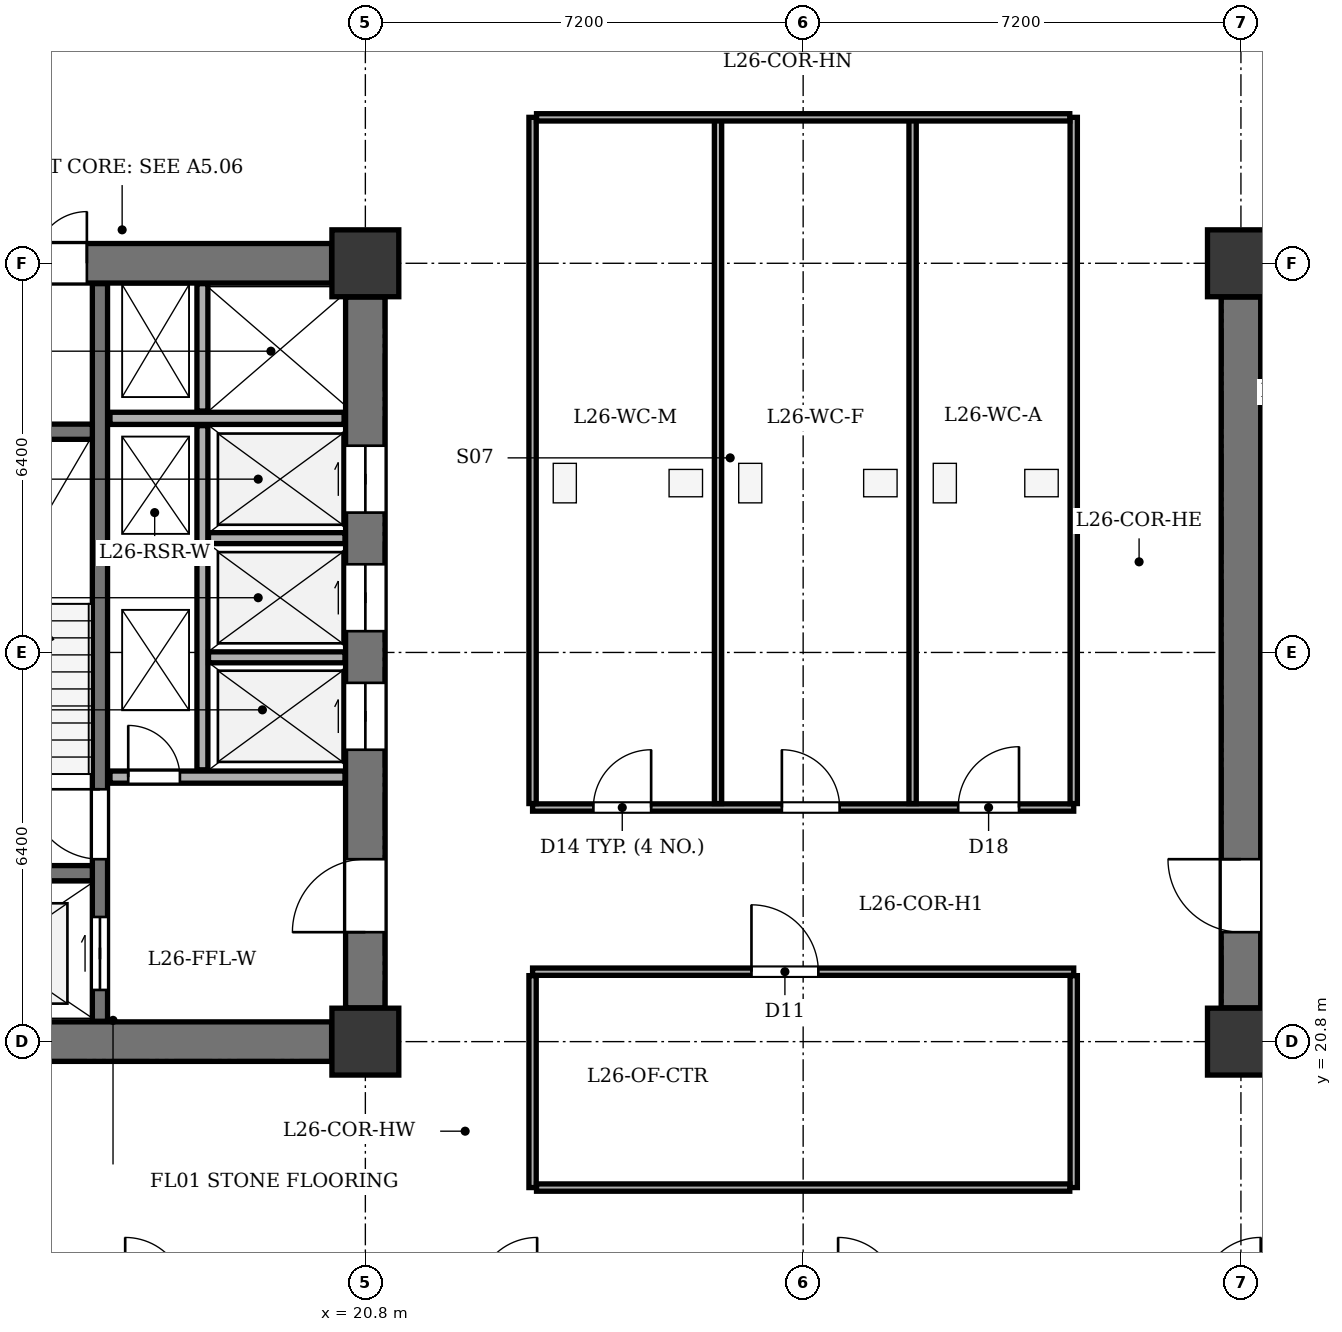
"""IFC4 building model, lengths in metres.
Left out: names, types, materials, properties, quantities, classifications, styles, units other than length and angle.
Written with IfcOpenShell. Run it as: python <this file> out.ifc"""

import sys

from ifc_helpers import new_model, si_unit, direction, frame, frame_2d, origin, origin_2d, place, context, subcontext, project, spatial, rectangle, extrude, element, fill, save


model = new_model("IFC4")
c1 = context("Model", 3, precision=1e-05, world=origin(), true_north=direction((0.0, 1.0)))
c2 = subcontext(c1, "Body", "Model", "MODEL_VIEW")
j1 = project(units=[si_unit("LENGTHUNIT", "METRE"), si_unit("PLANEANGLEUNIT", "RADIAN")], contexts=[c1])
p1 = place(None, origin())
s1 = spatial("IfcSite", under=j1, at=p1, CompositionType="ELEMENT")
p2 = place(p1, origin())
s2 = spatial("IfcBuilding", under=s1, at=p2, CompositionType="ELEMENT")
p3 = place(p2, frame((0.0, 0.0, 106.2)))
s3 = spatial("IfcBuildingStorey", under=s2, at=p3, CompositionType="ELEMENT", Elevation=106.2)
for number, where, z_axis, x_axis in (
    (1, (20.8, 20.8, 0.0), (0.0, 0.0, 1.0), (1.0, 0.0, 0.0)),
    (2, (20.8, 33.6, 0.0), (0.0, 0.0, 1.0), (1.0, 0.0, 0.0)),
    (3, (35.2, 20.8, 0.0), (0.0, 0.0, 1.0), (1.0, 0.0, 0.0)),
    (4, (35.2, 33.6, 0.0), (0.0, 0.0, 1.0), (1.0, 0.0, 0.0)),
):
    element("IfcColumn", number, at=place(p3, frame(where, z_axis=z_axis, x_axis=x_axis)), inside=s3, PredefinedType="COLUMN", context=c2, shape_type="SweptSolid", body=[
        extrude(rectangle(XDim=1.1, YDim=1.1, at=origin_2d()), origin(), (0.0, 0.0, 1.0), 3.9),
    ])
p4 = place(p3, frame((13.355, 20.8, 0.0), z_axis=(0.0, 0.0, 1.0), x_axis=(1.0, 0.0, 0.0)))
e5 = element("IfcWall", 5, at=p4, inside=s3, PredefinedType="SHEAR", context=c2, shape_type="SweptSolid", body=[
    extrude(rectangle(XDim=6.89, YDim=0.65, at=frame_2d((3.445, 0.0))), origin(), (0.0, 0.0, 1.0), 3.45),
])
p5 = place(p3, frame((13.355, 33.6, 0.0), z_axis=(0.0, 0.0, 1.0), x_axis=(1.0, 0.0, 0.0)))
e6 = element("IfcWall", 6, at=p5, inside=s3, PredefinedType="SHEAR", context=c2, shape_type="SweptSolid", body=[
    extrude(rectangle(XDim=6.89, YDim=0.65, at=frame_2d((3.445, 0.0))), origin(), (0.0, 0.0, 1.0), 3.45),
])
p6 = place(p5, frame((2.015, 0.0, 0.0)))
e7 = element("IfcOpeningElement", 7, at=p6, cuts=e6, PredefinedType="OPENING", context=c2, shape_type="SweptSolid", body=[
    extrude(rectangle(XDim=0.85, YDim=2.02, at=frame_2d((0.425, 1.01))), frame((0.0, 0.335, 0.0), z_axis=(0.0, -1.0, 0.0), x_axis=(1.0, 0.0, 0.0)), (0.0, 0.0, 1.0), 0.67),
])
p7 = place(p3, frame((20.8, 21.355, 0.0), z_axis=(0.0, 0.0, 1.0), x_axis=(0.0, 1.0, 0.0)))
e8 = element("IfcWall", 8, at=p7, inside=s3, PredefinedType="SHEAR", context=c2, shape_type="SweptSolid", body=[
    extrude(rectangle(XDim=11.69, YDim=0.65, at=frame_2d((5.845, 0.0))), origin(), (0.0, 0.0, 1.0), 3.45),
])
p8 = place(p7, frame((1.245, 0.0, 0.0)))
e9 = element("IfcOpeningElement", 9, at=p8, cuts=e8, PredefinedType="OPENING", context=c2, shape_type="SweptSolid", body=[
    extrude(rectangle(XDim=1.2, YDim=2.15, at=frame_2d((0.6, 1.075))), frame((0.0, 0.335, 0.0), z_axis=(0.0, -1.0, 0.0), x_axis=(1.0, 0.0, 0.0)), (0.0, 0.0, 1.0), 0.67),
])
p9 = place(p7, frame((4.245, 0.0, 0.0)))
e10 = element("IfcOpeningElement", 10, at=p9, cuts=e8, PredefinedType="OPENING", context=c2, shape_type="SweptSolid", body=[
    extrude(rectangle(XDim=1.1, YDim=2.1, at=frame_2d((0.55, 1.05))), frame((0.0, 0.335, 0.0), z_axis=(0.0, -1.0, 0.0), x_axis=(1.0, 0.0, 0.0)), (0.0, 0.0, 1.0), 0.67),
])
p10 = place(p7, frame((6.195, 0.0, 0.0)))
e11 = element("IfcOpeningElement", 11, at=p10, cuts=e8, PredefinedType="OPENING", context=c2, shape_type="SweptSolid", body=[
    extrude(rectangle(XDim=1.1, YDim=2.1, at=frame_2d((0.55, 1.05))), frame((0.0, 0.335, 0.0), z_axis=(0.0, -1.0, 0.0), x_axis=(1.0, 0.0, 0.0)), (0.0, 0.0, 1.0), 0.67),
])
p11 = place(p7, frame((8.145, 0.0, 0.0)))
e12 = element("IfcOpeningElement", 12, at=p11, cuts=e8, PredefinedType="OPENING", context=c2, shape_type="SweptSolid", body=[
    extrude(rectangle(XDim=1.1, YDim=2.1, at=frame_2d((0.55, 1.05))), frame((0.0, 0.335, 0.0), z_axis=(0.0, -1.0, 0.0), x_axis=(1.0, 0.0, 0.0)), (0.0, 0.0, 1.0), 0.67),
])
p12 = place(p3, frame((16.435, 21.135, 0.0), z_axis=(0.0, 0.0, 1.0), x_axis=(0.0, 1.0, 0.0)))
e13 = element("IfcWall", 13, at=p12, inside=s3, PredefinedType="SHEAR", context=c2, shape_type="SweptSolid", body=[
    extrude(rectangle(XDim=12.13, YDim=0.25, at=frame_2d((6.065, 0.0))), origin(), (0.0, 0.0, 1.0), 3.45),
])
p13 = place(p12, frame((0.515, 0.0, 0.0)))
e14 = element("IfcOpeningElement", 14, at=p13, cuts=e13, PredefinedType="OPENING", context=c2, shape_type="SweptSolid", body=[
    extrude(rectangle(XDim=1.2, YDim=2.15, at=frame_2d((0.6, 1.075))), frame((0.0, 0.135, 0.0), z_axis=(0.0, -1.0, 0.0), x_axis=(1.0, 0.0, 0.0)), (0.0, 0.0, 1.0), 0.27),
])
p14 = place(p12, frame((2.665, 0.0, 0.0)))
e15 = element("IfcOpeningElement", 15, at=p14, cuts=e13, PredefinedType="OPENING", context=c2, shape_type="SweptSolid", body=[
    extrude(rectangle(XDim=1.15, YDim=2.15, at=frame_2d((0.575, 1.075))), frame((0.0, 0.135, 0.0), z_axis=(0.0, -1.0, 0.0), x_axis=(1.0, 0.0, 0.0)), (0.0, 0.0, 1.0), 0.27),
])
for number, where, z_axis, x_axis in (
    (16, (13.135, 23.57, 0.0), (0.0, 0.0, 1.0), (1.0, 0.0, 0.0)),
    (17, (13.135, 30.83, 0.0), (0.0, 0.0, 1.0), (1.0, 0.0, 0.0)),
):
    element("IfcWall", number, at=place(p3, frame(where, z_axis=z_axis, x_axis=x_axis)), inside=s3, PredefinedType="SHEAR", context=c2, shape_type="SweptSolid", body=[
        extrude(rectangle(XDim=3.175, YDim=0.25, at=frame_2d((1.587, 0.0))), origin(), (0.0, 0.0, 1.0), 3.45),
    ])
p15 = place(p3, frame((16.6, 25.15, 0.0), z_axis=(0.0, 0.0, 1.0), x_axis=(1.0, 0.0, 0.0)))
e18 = element("IfcWall", 18, at=p15, inside=s3, PredefinedType="SOLIDWALL", context=c2, shape_type="SweptSolid", body=[
    extrude(rectangle(XDim=3.865, YDim=0.2, at=frame_2d((1.933, 0.0))), origin(), (0.0, 0.0, 1.0), 3.45),
])
p16 = place(p15, frame((0.3, 0.0, 0.0)))
e19 = element("IfcOpeningElement", 19, at=p16, cuts=e18, PredefinedType="OPENING", context=c2, shape_type="SweptSolid", body=[
    extrude(rectangle(XDim=0.85, YDim=2.02, at=frame_2d((0.425, 1.01))), frame((0.0, 0.11, 0.0), z_axis=(0.0, -1.0, 0.0), x_axis=(1.0, 0.0, 0.0)), (0.0, 0.0, 1.0), 0.22),
])
p17 = place(p3, frame((16.6, 31.05, 0.0), z_axis=(0.0, 0.0, 1.0), x_axis=(1.0, 0.0, 0.0)))
e20 = element("IfcWall", 20, at=p17, inside=s3, PredefinedType="SOLIDWALL", context=c2, shape_type="SweptSolid", body=[
    extrude(rectangle(XDim=3.85, YDim=0.2, at=frame_2d((1.925, 0.0))), origin(), (0.0, 0.0, 1.0), 3.45),
])
p18 = place(p3, frame((18.12, 25.27, 0.0), z_axis=(0.0, 0.0, 1.0), x_axis=(0.0, 1.0, 0.0)))
e21 = element("IfcWall", 21, at=p18, inside=s3, PredefinedType="PARTITIONING", context=c2, shape_type="SweptSolid", body=[
    extrude(rectangle(XDim=5.66, YDim=0.18, at=frame_2d((2.83, 0.0))), origin(), (0.0, 0.0, 1.0), 3.45),
])
p19 = place(p3, frame((18.12, 31.17, 0.0), z_axis=(0.0, 0.0, 1.0), x_axis=(0.0, 1.0, 0.0)))
e22 = element("IfcWall", 22, at=p19, inside=s3, PredefinedType="PARTITIONING", context=c2, shape_type="SweptSolid", body=[
    extrude(rectangle(XDim=2.095, YDim=0.18, at=frame_2d((1.047, 0.0))), origin(), (0.0, 0.0, 1.0), 3.45),
])
for number, where, z_axis, x_axis in (
    (23, (18.22, 27.12, 0.0), (0.0, 0.0, 1.0), (1.0, 0.0, 0.0)),
    (24, (18.22, 29.08, 0.0), (0.0, 0.0, 1.0), (1.0, 0.0, 0.0)),
):
    element("IfcWall", number, at=place(p3, frame(where, z_axis=z_axis, x_axis=x_axis)), inside=s3, PredefinedType="PARTITIONING", context=c2, shape_type="SweptSolid", body=[
        extrude(rectangle(XDim=2.245, YDim=0.18, at=frame_2d((1.123, 0.0))), origin(), (0.0, 0.0, 1.0), 3.45),
    ])
p20 = place(p3, frame((35.2, 21.355, 0.0), z_axis=(0.0, 0.0, 1.0), x_axis=(0.0, 1.0, 0.0)))
e25 = element("IfcWall", 25, at=p20, inside=s3, PredefinedType="SHEAR", context=c2, shape_type="SweptSolid", body=[
    extrude(rectangle(XDim=11.69, YDim=0.65, at=frame_2d((5.845, 0.0))), origin(), (0.0, 0.0, 1.0), 3.45),
])
p21 = place(p20, frame((1.245, 0.0, 0.0)))
e26 = element("IfcOpeningElement", 26, at=p21, cuts=e25, PredefinedType="OPENING", context=c2, shape_type="SweptSolid", body=[
    extrude(rectangle(XDim=1.2, YDim=2.15, at=frame_2d((0.6, 1.075))), frame((0.0, 0.335, 0.0), z_axis=(0.0, -1.0, 0.0), x_axis=(1.0, 0.0, 0.0)), (0.0, 0.0, 1.0), 0.67),
])
p22 = place(p3, frame((35.535, 25.15, 0.0), z_axis=(0.0, 0.0, 1.0), x_axis=(1.0, 0.0, 0.0)))
e27 = element("IfcWall", 27, at=p22, inside=s3, PredefinedType="SOLIDWALL", context=c2, shape_type="SweptSolid", body=[
    extrude(rectangle(XDim=3.865, YDim=0.2, at=frame_2d((1.933, 0.0))), origin(), (0.0, 0.0, 1.0), 3.45),
])
for number, where, z_axis, x_axis in (
    (28, (35.535, 27.12, 0.0), (0.0, 0.0, 1.0), (1.0, 0.0, 0.0)),
    (29, (35.535, 29.08, 0.0), (0.0, 0.0, 1.0), (1.0, 0.0, 0.0)),
):
    element("IfcWall", number, at=place(p3, frame(where, z_axis=z_axis, x_axis=x_axis)), inside=s3, PredefinedType="PARTITIONING", context=c2, shape_type="SweptSolid", body=[
        extrude(rectangle(XDim=2.245, YDim=0.18, at=frame_2d((1.123, 0.0))), origin(), (0.0, 0.0, 1.0), 3.45),
    ])
p23 = place(p3, frame((23.55, 24.65, 0.0), z_axis=(0.0, 0.0, 1.0), x_axis=(1.0, 0.0, 0.0)))
e30 = element("IfcWall", 30, at=p23, inside=s3, PredefinedType="PARTITIONING", context=c2, shape_type="SweptSolid", body=[
    extrude(rectangle(XDim=8.9, YDim=0.12, at=frame_2d((4.45, 0.0))), origin(), (0.0, 0.0, 1.0), 2.985),
])
p24 = place(p23, frame((1.0, 0.0, 0.0)))
e31 = element("IfcOpeningElement", 31, at=p24, cuts=e30, PredefinedType="OPENING", context=c2, shape_type="SweptSolid", body=[
    extrude(rectangle(XDim=0.95, YDim=2.1, at=frame_2d((0.475, 1.05))), frame((0.0, 0.07, 0.0), z_axis=(0.0, -1.0, 0.0), x_axis=(1.0, 0.0, 0.0)), (0.0, 0.0, 1.0), 0.14),
])
p25 = place(p23, frame((4.1, 0.0, 0.0)))
e32 = element("IfcOpeningElement", 32, at=p25, cuts=e30, PredefinedType="OPENING", context=c2, shape_type="SweptSolid", body=[
    extrude(rectangle(XDim=0.95, YDim=2.1, at=frame_2d((0.475, 1.05))), frame((0.0, 0.07, 0.0), z_axis=(0.0, -1.0, 0.0), x_axis=(1.0, 0.0, 0.0)), (0.0, 0.0, 1.0), 0.14),
])
p26 = place(p23, frame((7.0, 0.0, 0.0)))
e33 = element("IfcOpeningElement", 33, at=p26, cuts=e30, PredefinedType="OPENING", context=c2, shape_type="SweptSolid", body=[
    extrude(rectangle(XDim=1.0, YDim=2.1, at=frame_2d((0.5, 1.05))), frame((0.0, 0.07, 0.0), z_axis=(0.0, -1.0, 0.0), x_axis=(1.0, 0.0, 0.0)), (0.0, 0.0, 1.0), 0.14),
])
for number, where, z_axis, x_axis in (
    (34, (23.55, 24.715, 0.0), (0.0, 0.0, 1.0), (0.0, 1.0, 0.0)),
    (35, (32.45, 24.715, 0.0), (0.0, 0.0, 1.0), (0.0, 1.0, 0.0)),
    (36, (26.6, 24.715, 0.0), (0.0, 0.0, 1.0), (0.0, 1.0, 0.0)),
):
    element("IfcWall", number, at=place(p3, frame(where, z_axis=z_axis, x_axis=x_axis)), inside=s3, PredefinedType="PARTITIONING", context=c2, shape_type="SweptSolid", body=[
        extrude(rectangle(XDim=11.285, YDim=0.12, at=frame_2d((5.643, 0.0))), origin(), (0.0, 0.0, 1.0), 3.45),
    ])
p27 = place(p3, frame((29.8, 24.715, 0.0), z_axis=(0.0, 0.0, 1.0), x_axis=(0.0, 1.0, 0.0)))
e37 = element("IfcWall", 37, at=p27, inside=s3, PredefinedType="PARTITIONING", context=c2, shape_type="SweptSolid", body=[
    extrude(rectangle(XDim=11.285, YDim=0.12, at=frame_2d((5.643, 0.0))), origin(), (0.0, 0.0, 1.0), 2.985),
])
p28 = place(p3, frame((23.615, 36.0, 0.0), z_axis=(0.0, 0.0, 1.0), x_axis=(1.0, 0.0, 0.0)))
e38 = element("IfcWall", 38, at=p28, inside=s3, PredefinedType="PARTITIONING", context=c2, shape_type="SweptSolid", body=[
    extrude(rectangle(XDim=8.77, YDim=0.12, at=frame_2d((4.385, 0.0))), origin(), (0.0, 0.0, 1.0), 3.45),
])
p29 = place(p3, frame((23.55, 21.95, 0.0), z_axis=(0.0, 0.0, 1.0), x_axis=(1.0, 0.0, 0.0)))
e39 = element("IfcWall", 39, at=p29, inside=s3, PredefinedType="PARTITIONING", context=c2, shape_type="SweptSolid", body=[
    extrude(rectangle(XDim=8.9, YDim=0.12, at=frame_2d((4.45, 0.0))), origin(), (0.0, 0.0, 1.0), 2.985),
])
p30 = place(p29, frame((3.6, 0.0, 0.0)))
e40 = element("IfcOpeningElement", 40, at=p30, cuts=e39, PredefinedType="OPENING", context=c2, shape_type="SweptSolid", body=[
    extrude(rectangle(XDim=1.1, YDim=2.15, at=frame_2d((0.55, 1.075))), frame((0.0, 0.07, 0.0), z_axis=(0.0, -1.0, 0.0), x_axis=(1.0, 0.0, 0.0)), (0.0, 0.0, 1.0), 0.14),
])
for number, where, z_axis, x_axis in (
    (41, (23.55, 18.4, 0.0), (0.0, 0.0, 1.0), (0.0, 1.0, 0.0)),
    (42, (32.45, 18.4, 0.0), (0.0, 0.0, 1.0), (0.0, 1.0, 0.0)),
):
    element("IfcWall", number, at=place(p3, frame(where, z_axis=z_axis, x_axis=x_axis)), inside=s3, PredefinedType="PARTITIONING", context=c2, shape_type="SweptSolid", body=[
        extrude(rectangle(XDim=3.485, YDim=0.12, at=frame_2d((1.743, 0.0))), origin(), (0.0, 0.0, 1.0), 3.45),
    ])
p31 = place(p3, frame((23.615, 18.4, 0.0), z_axis=(0.0, 0.0, 1.0), x_axis=(1.0, 0.0, 0.0)))
e43 = element("IfcWall", 43, at=p31, inside=s3, PredefinedType="PARTITIONING", context=c2, shape_type="SweptSolid", body=[
    extrude(rectangle(XDim=8.77, YDim=0.12, at=frame_2d((4.385, 0.0))), origin(), (0.0, 0.0, 1.0), 3.45),
])
p32 = place(p6, origin())
e44 = element("IfcDoor", 44, at=p32, inside=s3, OperationType="SINGLE_SWING_RIGHT", PredefinedType="DOOR", context=c2, shape_type="SweptSolid", body=[
    extrude(rectangle(XDim=0.85, YDim=2.02, at=frame_2d((0.425, 1.01))), frame((0.0, 0.025, 0.0), z_axis=(0.0, -1.0, 0.0), x_axis=(1.0, 0.0, 0.0)), (0.0, 0.0, 1.0), 0.05),
])
fill(e7, e44)
p33 = place(p8, origin())
e45 = element("IfcDoor", 45, at=p33, inside=s3, OperationType="SINGLE_SWING_LEFT", PredefinedType="DOOR", context=c2, shape_type="SweptSolid", body=[
    extrude(rectangle(XDim=1.2, YDim=2.15, at=frame_2d((0.6, 1.075))), frame((0.0, 0.025, 0.0), z_axis=(0.0, -1.0, 0.0), x_axis=(1.0, 0.0, 0.0)), (0.0, 0.0, 1.0), 0.05),
])
fill(e9, e45)
p34 = place(p9, origin())
e46 = element("IfcDoor", 46, at=p34, inside=s3, OperationType="DOUBLE_DOOR_SLIDING", PredefinedType="DOOR", context=c2, shape_type="SweptSolid", body=[
    extrude(rectangle(XDim=1.1, YDim=2.1, at=frame_2d((0.55, 1.05))), frame((0.0, 0.025, 0.0), z_axis=(0.0, -1.0, 0.0), x_axis=(1.0, 0.0, 0.0)), (0.0, 0.0, 1.0), 0.05),
])
fill(e10, e46)
p35 = place(p10, origin())
e47 = element("IfcDoor", 47, at=p35, inside=s3, OperationType="DOUBLE_DOOR_SLIDING", PredefinedType="DOOR", context=c2, shape_type="SweptSolid", body=[
    extrude(rectangle(XDim=1.1, YDim=2.1, at=frame_2d((0.55, 1.05))), frame((0.0, 0.025, 0.0), z_axis=(0.0, -1.0, 0.0), x_axis=(1.0, 0.0, 0.0)), (0.0, 0.0, 1.0), 0.05),
])
fill(e11, e47)
p36 = place(p11, origin())
e48 = element("IfcDoor", 48, at=p36, inside=s3, OperationType="DOUBLE_DOOR_SLIDING", PredefinedType="DOOR", context=c2, shape_type="SweptSolid", body=[
    extrude(rectangle(XDim=1.1, YDim=2.1, at=frame_2d((0.55, 1.05))), frame((0.0, 0.025, 0.0), z_axis=(0.0, -1.0, 0.0), x_axis=(1.0, 0.0, 0.0)), (0.0, 0.0, 1.0), 0.05),
])
fill(e12, e48)
p37 = place(p13, origin())
e49 = element("IfcDoor", 49, at=p37, inside=s3, OperationType="DOUBLE_DOOR_SLIDING", PredefinedType="DOOR", context=c2, shape_type="SweptSolid", body=[
    extrude(rectangle(XDim=1.2, YDim=2.15, at=frame_2d((0.6, 1.075))), frame((0.0, 0.025, 0.0), z_axis=(0.0, -1.0, 0.0), x_axis=(1.0, 0.0, 0.0)), (0.0, 0.0, 1.0), 0.05),
])
fill(e14, e49)
p38 = place(p14, origin())
e50 = element("IfcDoor", 50, at=p38, inside=s3, OperationType="SINGLE_SWING_RIGHT", PredefinedType="DOOR", context=c2, shape_type="SweptSolid", body=[
    extrude(rectangle(XDim=1.15, YDim=2.15, at=frame_2d((0.575, 1.075))), frame((0.0, 0.025, 0.0), z_axis=(0.0, -1.0, 0.0), x_axis=(1.0, 0.0, 0.0)), (0.0, 0.0, 1.0), 0.05),
])
fill(e15, e50)
p39 = place(p16, origin())
e51 = element("IfcDoor", 51, at=p39, inside=s3, OperationType="SINGLE_SWING_LEFT", PredefinedType="DOOR", context=c2, shape_type="SweptSolid", body=[
    extrude(rectangle(XDim=0.85, YDim=2.02, at=frame_2d((0.425, 1.01))), frame((0.0, 0.025, 0.0), z_axis=(0.0, -1.0, 0.0), x_axis=(1.0, 0.0, 0.0)), (0.0, 0.0, 1.0), 0.05),
])
fill(e19, e51)
p40 = place(p21, origin())
e52 = element("IfcDoor", 52, at=p40, inside=s3, OperationType="SINGLE_SWING_RIGHT", PredefinedType="DOOR", context=c2, shape_type="SweptSolid", body=[
    extrude(rectangle(XDim=1.2, YDim=2.15, at=frame_2d((0.6, 1.075))), frame((0.0, 0.025, 0.0), z_axis=(0.0, -1.0, 0.0), x_axis=(1.0, 0.0, 0.0)), (0.0, 0.0, 1.0), 0.05),
])
fill(e26, e52)
p41 = place(p24, origin())
e53 = element("IfcDoor", 53, at=p41, inside=s3, OperationType="SINGLE_SWING_RIGHT", PredefinedType="DOOR", context=c2, shape_type="SweptSolid", body=[
    extrude(rectangle(XDim=0.95, YDim=2.1, at=frame_2d((0.475, 1.05))), frame((0.0, 0.025, 0.0), z_axis=(0.0, -1.0, 0.0), x_axis=(1.0, 0.0, 0.0)), (0.0, 0.0, 1.0), 0.05),
])
fill(e31, e53)
p42 = place(p25, origin())
e54 = element("IfcDoor", 54, at=p42, inside=s3, OperationType="SINGLE_SWING_LEFT", PredefinedType="DOOR", context=c2, shape_type="SweptSolid", body=[
    extrude(rectangle(XDim=0.95, YDim=2.1, at=frame_2d((0.475, 1.05))), frame((0.0, 0.025, 0.0), z_axis=(0.0, -1.0, 0.0), x_axis=(1.0, 0.0, 0.0)), (0.0, 0.0, 1.0), 0.05),
])
fill(e32, e54)
p43 = place(p26, origin())
e55 = element("IfcDoor", 55, at=p43, inside=s3, OperationType="SINGLE_SWING_RIGHT", PredefinedType="DOOR", context=c2, shape_type="SweptSolid", body=[
    extrude(rectangle(XDim=1.0, YDim=2.1, at=frame_2d((0.5, 1.05))), frame((0.0, 0.025, 0.0), z_axis=(0.0, -1.0, 0.0), x_axis=(1.0, 0.0, 0.0)), (0.0, 0.0, 1.0), 0.05),
])
fill(e33, e55)
p44 = place(p30, origin())
e56 = element("IfcDoor", 56, at=p44, inside=s3, OperationType="SINGLE_SWING_LEFT", PredefinedType="DOOR", context=c2, shape_type="SweptSolid", body=[
    extrude(rectangle(XDim=1.1, YDim=2.15, at=frame_2d((0.55, 1.075))), frame((0.0, 0.025, 0.0), z_axis=(0.0, -1.0, 0.0), x_axis=(1.0, 0.0, 0.0)), (0.0, 0.0, 1.0), 0.05),
])
fill(e40, e56)
save(model, sys.argv[1])
